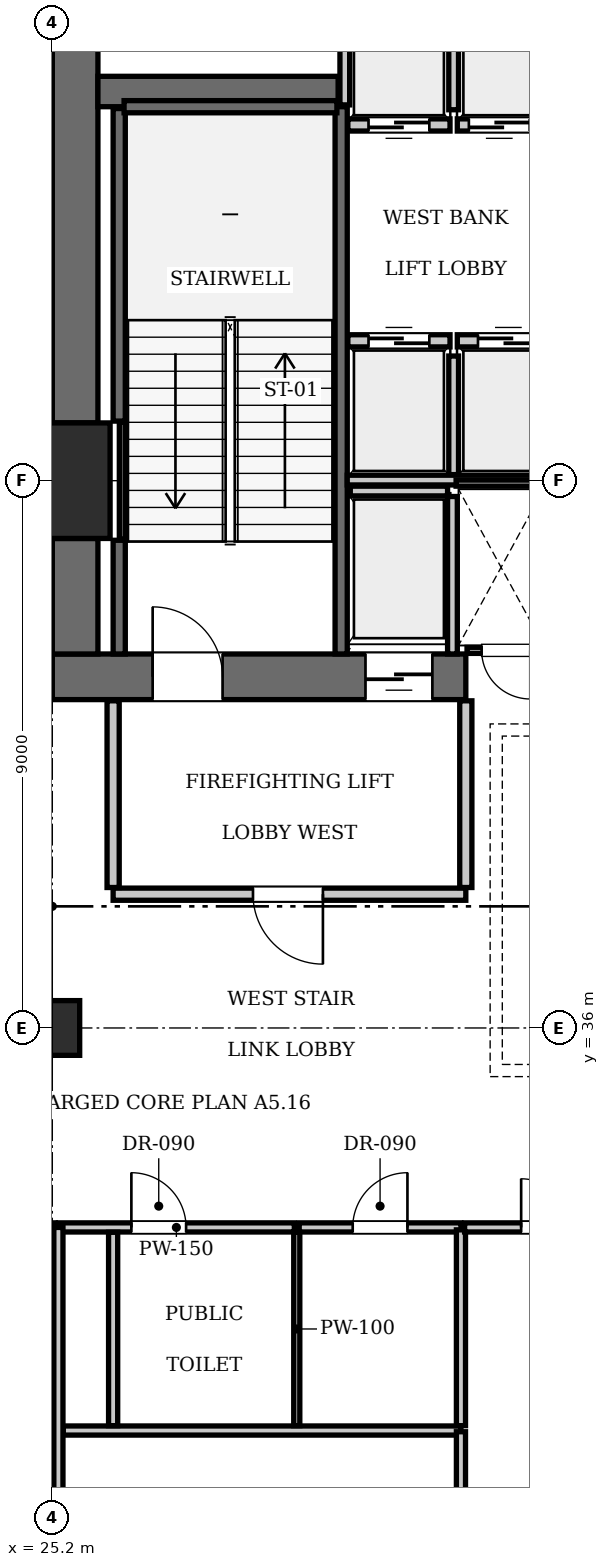
"""IFC4 building model, lengths in metres.
Left out: names, types, materials, properties, quantities, classifications, styles, units other than length and angle.
Written with IfcOpenShell. Run it as: python <this file> out.ifc"""

import sys

from ifc_helpers import new_model, si_unit, direction, frame, frame_2d, origin, origin_2d, place, context, subcontext, project, spatial, rectangle, extrude, element, fill, save


model = new_model("IFC4")
c1 = context("Model", 3, precision=1e-05, world=origin(), true_north=direction((0.0, 1.0)))
c2 = subcontext(c1, "Body", "Model", "MODEL_VIEW")
j1 = project(units=[si_unit("LENGTHUNIT", "METRE"), si_unit("PLANEANGLEUNIT", "RADIAN")], contexts=[c1])
p1 = place(None, origin())
s1 = spatial("IfcSite", under=j1, at=p1, CompositionType="ELEMENT")
p2 = place(p1, origin())
s2 = spatial("IfcBuilding", under=s1, at=p2, CompositionType="ELEMENT")
p3 = place(p2, frame((0.0, 0.0, 122.5)))
s3 = spatial("IfcBuildingStorey", under=s2, at=p3, CompositionType="ELEMENT", Elevation=122.5)
p4 = place(p3, frame((25.2, 45.0, 0.0), z_axis=(0.0, 0.0, 1.0), x_axis=(1.0, 0.0, 0.0)))
e1 = element("IfcColumn", 1, at=p4, inside=s3, PredefinedType="COLUMN", context=c2, shape_type="SweptSolid", body=[
    extrude(rectangle(XDim=1.9, YDim=1.9, at=origin_2d()), origin(), (0.0, 0.0, 1.0), 4.9),
])
p5 = place(p3, frame((25.2, 41.775, 0.0), z_axis=(0.0, 0.0, 1.0), x_axis=(1.0, 0.0, 0.0)))
e2 = element("IfcWall", 2, at=p5, inside=s3, PredefinedType="SHEAR", context=c2, shape_type="SweptSolid", body=[
    extrude(rectangle(XDim=6.8, YDim=0.75, at=frame_2d((3.4, 0.0))), origin(), (0.0, 0.0, 1.0), 4.9),
])
p6 = place(p5, frame((1.65, 0.0, 0.0)))
e3 = element("IfcOpeningElement", 3, at=p6, cuts=e2, PredefinedType="OPENING", context=c2, shape_type="SweptSolid", body=[
    extrude(rectangle(XDim=1.15, YDim=2.15, at=frame_2d((0.575, 1.075))), frame((0.0, 0.385, 0.0), z_axis=(0.0, -1.0, 0.0), x_axis=(1.0, 0.0, 0.0)), (0.0, 0.0, 1.0), 0.77),
])
p7 = place(p5, frame((5.15, 0.0, 0.0)))
e4 = element("IfcOpeningElement", 4, at=p7, cuts=e2, PredefinedType="OPENING", context=c2, shape_type="SweptSolid", body=[
    extrude(rectangle(XDim=1.1, YDim=2.2, at=frame_2d((0.55, 1.1))), frame((0.0, 0.385, 0.0), z_axis=(0.0, -1.0, 0.0), x_axis=(1.0, 0.0, 0.0)), (0.0, 0.0, 1.0), 0.77),
])
p8 = place(p3, frame((25.575, 42.15, 0.0), z_axis=(0.0, 0.0, 1.0), x_axis=(0.0, 1.0, 0.0)))
e5 = element("IfcWall", 5, at=p8, inside=s3, PredefinedType="SHEAR", context=c2, shape_type="SweptSolid", body=[
    extrude(rectangle(XDim=1.9, YDim=0.75, at=frame_2d((0.95, 0.0))), origin(), (0.0, 0.0, 1.0), 4.9),
])
p9 = place(p3, frame((25.575, 45.95, 0.0), z_axis=(0.0, 0.0, 1.0), x_axis=(0.0, 1.0, 0.0)))
e6 = element("IfcWall", 6, at=p9, inside=s3, PredefinedType="SHEAR", context=c2, shape_type="SweptSolid", body=[
    extrude(rectangle(XDim=7.3, YDim=0.75, at=frame_2d((3.65, 0.0))), origin(), (0.0, 0.0, 1.0), 4.9),
])
p10 = place(p3, frame((25.95, 51.4, 0.0), z_axis=(0.0, 0.0, 1.0), x_axis=(1.0, 0.0, 0.0)))
e7 = element("IfcWall", 7, at=p10, inside=s3, PredefinedType="SHEAR", context=c2, shape_type="SweptSolid", body=[
    extrude(rectangle(XDim=3.95, YDim=0.5, at=frame_2d((1.975, 0.0))), origin(), (0.0, 0.0, 1.0), 4.9),
])
p11 = place(p3, frame((25.2, 36.0, 0.0), z_axis=(0.0, 0.0, 1.0), x_axis=(1.0, 0.0, 0.0)))
e8 = element("IfcColumn", 8, at=p11, inside=s3, PredefinedType="COLUMN", context=c2, shape_type="SweptSolid", body=[
    extrude(rectangle(XDim=0.9, YDim=0.9, at=origin_2d()), origin(), (0.0, 0.0, 1.0), 4.9),
])
p12 = place(p3, frame((29.95, 42.15, 0.0), z_axis=(0.0, 0.0, 1.0), x_axis=(0.0, 1.0, 0.0)))
e9 = element("IfcWall", 9, at=p12, inside=s3, PredefinedType="SOLIDWALL", context=c2, shape_type="SweptSolid", body=[
    extrude(rectangle(XDim=9.0, YDim=0.2, at=frame_2d((4.5, 0.0))), origin(), (0.0, 0.0, 1.0), 4.66),
])
p13 = place(p3, frame((26.3, 42.15, 0.0), z_axis=(0.0, 0.0, 1.0), x_axis=(0.0, 1.0, 0.0)))
e10 = element("IfcWall", 10, at=p13, inside=s3, PredefinedType="SOLIDWALL", context=c2, shape_type="SweptSolid", body=[
    extrude(rectangle(XDim=1.87, YDim=0.2, at=frame_2d((0.935, 0.0))), origin(), (0.0, 0.0, 1.0), 4.66),
])
p14 = place(p3, frame((26.3, 45.98, 0.0), z_axis=(0.0, 0.0, 1.0), x_axis=(0.0, 1.0, 0.0)))
e11 = element("IfcWall", 11, at=p14, inside=s3, PredefinedType="SOLIDWALL", context=c2, shape_type="SweptSolid", body=[
    extrude(rectangle(XDim=5.14, YDim=0.2, at=frame_2d((2.57, 0.0))), origin(), (0.0, 0.0, 1.0), 4.66),
])
p15 = place(p3, frame((26.38, 51.15, 0.0), z_axis=(0.0, 0.0, 1.0), x_axis=(1.0, 0.0, 0.0)))
e12 = element("IfcWall", 12, at=p15, inside=s3, PredefinedType="SOLIDWALL", context=c2, shape_type="SweptSolid", body=[
    extrude(rectangle(XDim=3.5, YDim=0.2, at=frame_2d((1.75, 0.0))), origin(), (0.0, 0.0, 1.0), 4.66),
])
p16 = place(p3, frame((26.352, 44.04, 0.0), z_axis=(0.0, 0.0, 1.0), x_axis=(0.0, 1.0, 0.0)))
e13 = element("IfcWall", 13, at=p16, inside=s3, PredefinedType="SOLIDWALL", context=c2, shape_type="SweptSolid", body=[
    extrude(rectangle(XDim=1.92, YDim=0.1, at=frame_2d((0.96, 0.0))), origin(), (0.0, 0.0, 1.0), 4.66),
])
p17 = place(p3, frame((30.06, 47.3, 0.0), z_axis=(0.0, 0.0, 1.0), x_axis=(1.0, 0.0, 0.0)))
e14 = element("IfcWall", 14, at=p17, inside=s3, PredefinedType="SOLIDWALL", context=c2, shape_type="SweptSolid", body=[
    extrude(rectangle(XDim=1.68, YDim=0.2, at=frame_2d((0.84, 0.0))), origin(), (0.0, 0.0, 1.0), 4.66),
])
p18 = place(p17, frame((0.34, 0.0, 0.0)))
e15 = element("IfcOpeningElement", 15, at=p18, cuts=e14, PredefinedType="OPENING", context=c2, shape_type="SweptSolid", body=[
    extrude(rectangle(XDim=1.0, YDim=2.15, at=frame_2d((0.5, 1.075))), frame((0.0, 0.11, 0.0), z_axis=(0.0, -1.0, 0.0), x_axis=(1.0, 0.0, 0.0)), (0.0, 0.0, 1.0), 0.22),
])
p19 = place(p3, frame((31.86, 47.3, 0.0), z_axis=(0.0, 0.0, 1.0), x_axis=(1.0, 0.0, 0.0)))
e16 = element("IfcWall", 16, at=p19, inside=s3, PredefinedType="SOLIDWALL", context=c2, shape_type="SweptSolid", body=[
    extrude(rectangle(XDim=1.68, YDim=0.2, at=frame_2d((0.84, 0.0))), origin(), (0.0, 0.0, 1.0), 4.66),
])
p20 = place(p19, frame((0.34, 0.0, 0.0)))
e17 = element("IfcOpeningElement", 17, at=p20, cuts=e16, PredefinedType="OPENING", context=c2, shape_type="SweptSolid", body=[
    extrude(rectangle(XDim=1.0, YDim=2.15, at=frame_2d((0.5, 1.075))), frame((0.0, 0.11, 0.0), z_axis=(0.0, -1.0, 0.0), x_axis=(1.0, 0.0, 0.0)), (0.0, 0.0, 1.0), 0.22),
])
p21 = place(p3, frame((30.06, 50.85, 0.0), z_axis=(0.0, 0.0, 1.0), x_axis=(1.0, 0.0, 0.0)))
e18 = element("IfcWall", 18, at=p21, inside=s3, PredefinedType="SOLIDWALL", context=c2, shape_type="SweptSolid", body=[
    extrude(rectangle(XDim=1.68, YDim=0.2, at=frame_2d((0.84, 0.0))), origin(), (0.0, 0.0, 1.0), 4.66),
])
p22 = place(p21, frame((0.34, 0.0, 0.0)))
e19 = element("IfcOpeningElement", 19, at=p22, cuts=e18, PredefinedType="OPENING", context=c2, shape_type="SweptSolid", body=[
    extrude(rectangle(XDim=1.0, YDim=2.15, at=frame_2d((0.5, 1.075))), frame((0.0, 0.11, 0.0), z_axis=(0.0, -1.0, 0.0), x_axis=(1.0, 0.0, 0.0)), (0.0, 0.0, 1.0), 0.22),
])
p23 = place(p3, frame((31.86, 50.85, 0.0), z_axis=(0.0, 0.0, 1.0), x_axis=(1.0, 0.0, 0.0)))
e20 = element("IfcWall", 20, at=p23, inside=s3, PredefinedType="SOLIDWALL", context=c2, shape_type="SweptSolid", body=[
    extrude(rectangle(XDim=1.38, YDim=0.2, at=frame_2d((0.69, 0.0))), origin(), (0.0, 0.0, 1.0), 4.66),
])
p24 = place(p23, frame((0.19, 0.0, 0.0)))
e21 = element("IfcOpeningElement", 21, at=p24, cuts=e20, PredefinedType="OPENING", context=c2, shape_type="SweptSolid", body=[
    extrude(rectangle(XDim=1.0, YDim=2.15, at=frame_2d((0.5, 1.075))), frame((0.0, 0.11, 0.0), z_axis=(0.0, -1.0, 0.0), x_axis=(1.0, 0.0, 0.0)), (0.0, 0.0, 1.0), 0.22),
])
p25 = place(p3, frame((30.1, 44.83, 0.0), z_axis=(0.0, 0.0, 1.0), x_axis=(1.0, 0.0, 0.0)))
e22 = element("IfcWall", 22, at=p25, inside=s3, PredefinedType="SOLIDWALL", context=c2, shape_type="SweptSolid", body=[
    extrude(rectangle(XDim=1.6, YDim=0.16, at=frame_2d((0.8, 0.0))), origin(), (0.0, 0.0, 1.0), 4.66),
])
p26 = place(p3, frame((31.78, 42.15, 0.0), z_axis=(0.0, 0.0, 1.0), x_axis=(0.0, 1.0, 0.0)))
e23 = element("IfcWall", 23, at=p26, inside=s3, PredefinedType="SOLIDWALL", context=c2, shape_type="SweptSolid", body=[
    extrude(rectangle(XDim=2.59, YDim=0.16, at=frame_2d((1.295, 0.0))), origin(), (0.0, 0.0, 1.0), 4.66),
])
p27 = place(p3, frame((31.8, 45.1, 0.0), z_axis=(0.0, 0.0, 1.0), x_axis=(0.0, 1.0, 0.0)))
e24 = element("IfcWall", 24, at=p27, inside=s3, PredefinedType="SOLIDWALL", context=c2, shape_type="SweptSolid", body=[
    extrude(rectangle(XDim=1.95, YDim=0.16, at=frame_2d((0.975, 0.0))), origin(), (0.0, 0.0, 1.0), 4.66),
])
p28 = place(p3, frame((30.05, 45.01, 0.0), z_axis=(0.0, 0.0, 1.0), x_axis=(1.0, 0.0, 0.0)))
e25 = element("IfcWall", 25, at=p28, inside=s3, PredefinedType="SOLIDWALL", context=c2, shape_type="SweptSolid", body=[
    extrude(rectangle(XDim=3.45, YDim=0.16, at=frame_2d((1.725, 0.0))), origin(), (0.0, 0.0, 1.0), 4.66),
])
p29 = place(p3, frame((30.01, 51.18, 0.0), z_axis=(0.0, 0.0, 1.0), x_axis=(0.0, 1.0, 0.0)))
e26 = element("IfcWall", 26, at=p29, inside=s3, PredefinedType="SOLIDWALL", context=c2, shape_type="SweptSolid", body=[
    extrude(rectangle(XDim=2.07, YDim=0.16, at=frame_2d((1.035, 0.0))), origin(), (0.0, 0.0, 1.0), 4.66),
])
p30 = place(p3, frame((31.8, 51.1, 0.0), z_axis=(0.0, 0.0, 1.0), x_axis=(0.0, 1.0, 0.0)))
e27 = element("IfcWall", 27, at=p30, inside=s3, PredefinedType="SOLIDWALL", context=c2, shape_type="SweptSolid", body=[
    extrude(rectangle(XDim=2.15, YDim=0.16, at=frame_2d((1.075, 0.0))), origin(), (0.0, 0.0, 1.0), 4.66),
])
p31 = place(p3, frame((26.2, 38.2, 0.0), z_axis=(0.0, 0.0, 1.0), x_axis=(1.0, 0.0, 0.0)))
e28 = element("IfcWall", 28, at=p31, inside=s3, PredefinedType="PARTITIONING", context=c2, shape_type="SweptSolid", body=[
    extrude(rectangle(XDim=5.8, YDim=0.2, at=frame_2d((2.9, 0.0))), origin(), (0.0, 0.0, 1.0), 4.66),
])
p32 = place(p31, frame((2.3, 0.0, 0.0)))
e29 = element("IfcOpeningElement", 29, at=p32, cuts=e28, PredefinedType="OPENING", context=c2, shape_type="SweptSolid", body=[
    extrude(rectangle(XDim=1.15, YDim=2.15, at=frame_2d((0.575, 1.075))), frame((0.0, 0.11, 0.0), z_axis=(0.0, -1.0, 0.0), x_axis=(1.0, 0.0, 0.0)), (0.0, 0.0, 1.0), 0.22),
])
for number, where, z_axis, x_axis in (
    (30, (26.2, 38.31, 0.0), (0.0, 0.0, 1.0), (0.0, 1.0, 0.0)),
    (31, (32.0, 38.31, 0.0), (0.0, 0.0, 1.0), (0.0, 1.0, 0.0)),
):
    element("IfcWall", number, at=place(p3, frame(where, z_axis=z_axis, x_axis=x_axis)), inside=s3, PredefinedType="PARTITIONING", context=c2, shape_type="SweptSolid", body=[
        extrude(rectangle(XDim=3.07, YDim=0.2, at=frame_2d((1.535, 0.0))), origin(), (0.0, 0.0, 1.0), 4.66),
    ])
p33 = place(p3, frame((32.02, 42.21, 0.0), z_axis=(0.0, 0.0, 1.0), x_axis=(1.0, 0.0, 0.0)))
e32 = element("IfcWall", 32, at=p33, inside=s3, PredefinedType="PARTITIONING", context=c2, shape_type="SweptSolid", body=[
    extrude(rectangle(XDim=1.32, YDim=0.1, at=frame_2d((0.66, 0.0))), origin(), (0.0, 0.0, 1.0), 4.66),
])
p34 = place(p33, frame((0.24, 0.0, 0.0)))
e33 = element("IfcOpeningElement", 33, at=p34, cuts=e32, PredefinedType="OPENING", context=c2, shape_type="SweptSolid", body=[
    extrude(rectangle(XDim=0.8, YDim=2.05, at=frame_2d((0.4, 1.025))), frame((0.0, 0.06, 0.0), z_axis=(0.0, -1.0, 0.0), x_axis=(1.0, 0.0, 0.0)), (0.0, 0.0, 1.0), 0.12),
])
p35 = place(p3, frame((31.84, 44.96, 0.0), z_axis=(0.0, 0.0, 1.0), x_axis=(1.0, 0.0, 0.0)))
e34 = element("IfcWall", 34, at=p35, inside=s3, PredefinedType="PARTITIONING", context=c2, shape_type="SweptSolid", body=[
    extrude(rectangle(XDim=1.48, YDim=0.1, at=frame_2d((0.74, 0.0))), origin(), (0.0, 0.0, 1.0), 4.66),
])
p36 = place(p3, frame((25.3, 32.72, 0.0), z_axis=(0.0, 0.0, 1.0), x_axis=(1.0, 0.0, 0.0)))
e35 = element("IfcWall", 35, at=p36, inside=s3, PredefinedType="PARTITIONING", context=c2, shape_type="SweptSolid", body=[
    extrude(rectangle(XDim=3.88, YDim=0.15, at=frame_2d((1.94, 0.0))), origin(), (0.0, 0.0, 1.0), 4.66),
])
p37 = place(p36, frame((1.2, 0.0, 0.0)))
e36 = element("IfcOpeningElement", 36, at=p37, cuts=e35, PredefinedType="OPENING", context=c2, shape_type="SweptSolid", body=[
    extrude(rectangle(XDim=0.9, YDim=2.1, at=frame_2d((0.45, 1.05))), frame((0.0, 0.085, 0.0), z_axis=(0.0, -1.0, 0.0), x_axis=(1.0, 0.0, 0.0)), (0.0, 0.0, 1.0), 0.17),
])
p38 = place(p3, frame((29.26, 32.72, 0.0), z_axis=(0.0, 0.0, 1.0), x_axis=(1.0, 0.0, 0.0)))
e37 = element("IfcWall", 37, at=p38, inside=s3, PredefinedType="PARTITIONING", context=c2, shape_type="SweptSolid", body=[
    extrude(rectangle(XDim=2.66, YDim=0.15, at=frame_2d((1.33, 0.0))), origin(), (0.0, 0.0, 1.0), 4.66),
])
p39 = place(p38, frame((0.88, 0.0, 0.0)))
e38 = element("IfcOpeningElement", 38, at=p39, cuts=e37, PredefinedType="OPENING", context=c2, shape_type="SweptSolid", body=[
    extrude(rectangle(XDim=0.9, YDim=2.1, at=frame_2d((0.45, 1.05))), frame((0.0, 0.085, 0.0), z_axis=(0.0, -1.0, 0.0), x_axis=(1.0, 0.0, 0.0)), (0.0, 0.0, 1.0), 0.17),
])
p40 = place(p3, frame((25.38, 29.38, 0.0), z_axis=(0.0, 0.0, 1.0), x_axis=(1.0, 0.0, 0.0)))
e39 = element("IfcWall", 39, at=p40, inside=s3, PredefinedType="PARTITIONING", context=c2, shape_type="SweptSolid", body=[
    extrude(rectangle(XDim=6.54, YDim=0.15, at=frame_2d((3.27, 0.0))), origin(), (0.0, 0.0, 1.0), 4.66),
])
p41 = place(p3, frame((26.2, 29.46, 0.0), z_axis=(0.0, 0.0, 1.0), x_axis=(0.0, 1.0, 0.0)))
e40 = element("IfcWall", 40, at=p41, inside=s3, PredefinedType="PARTITIONING", context=c2, shape_type="SweptSolid", body=[
    extrude(rectangle(XDim=3.18, YDim=0.15, at=frame_2d((1.59, 0.0))), origin(), (0.0, 0.0, 1.0), 4.66),
])
p42 = place(p3, frame((29.22, 29.46, 0.0), z_axis=(0.0, 0.0, 1.0), x_axis=(0.0, 1.0, 0.0)))
e41 = element("IfcWall", 41, at=p42, inside=s3, PredefinedType="PARTITIONING", context=c2, shape_type="SweptSolid", body=[
    extrude(rectangle(XDim=3.18, YDim=0.1, at=frame_2d((1.59, 0.0))), origin(), (0.0, 0.0, 1.0), 4.66),
])
p43 = place(p3, frame((31.92, 29.46, 0.0), z_axis=(0.0, 0.0, 1.0), x_axis=(0.0, 1.0, 0.0)))
e42 = element("IfcWall", 42, at=p43, inside=s3, PredefinedType="PARTITIONING", context=c2, shape_type="SweptSolid", body=[
    extrude(rectangle(XDim=3.22, YDim=0.15, at=frame_2d((1.61, 0.0))), origin(), (0.0, 0.0, 1.0), 4.66),
])
p44 = place(p3, frame((31.92, 21.08, 0.0), z_axis=(0.0, 0.0, 1.0), x_axis=(0.0, 1.0, 0.0)))
e43 = element("IfcWall", 43, at=p44, inside=s3, PredefinedType="PARTITIONING", context=c2, shape_type="SweptSolid", body=[
    extrude(rectangle(XDim=8.28, YDim=0.15, at=frame_2d((4.14, 0.0))), origin(), (0.0, 0.0, 1.0), 4.66),
])
p45 = place(p44, frame((3.69, 0.0, 0.0)))
e44 = element("IfcOpeningElement", 44, at=p45, cuts=e43, PredefinedType="OPENING", context=c2, shape_type="SweptSolid", body=[
    extrude(rectangle(XDim=0.9, YDim=2.1, at=frame_2d((0.45, 1.05))), frame((0.0, 0.085, 0.0), z_axis=(0.0, -1.0, 0.0), x_axis=(1.0, 0.0, 0.0)), (0.0, 0.0, 1.0), 0.17),
])
p46 = place(p3, frame((31.98, 32.72, 0.0), z_axis=(0.0, 0.0, 1.0), x_axis=(1.0, 0.0, 0.0)))
e45 = element("IfcWall", 45, at=p46, inside=s3, PredefinedType="PARTITIONING", context=c2, shape_type="SweptSolid", body=[
    extrude(rectangle(XDim=3.46, YDim=0.15, at=frame_2d((1.73, 0.0))), origin(), (0.0, 0.0, 1.0), 4.66),
])
p47 = place(p46, frame((0.93, 0.0, 0.0)))
e46 = element("IfcOpeningElement", 46, at=p47, cuts=e45, PredefinedType="OPENING", context=c2, shape_type="SweptSolid", body=[
    extrude(rectangle(XDim=1.6, YDim=2.3, at=frame_2d((0.8, 1.15))), frame((0.0, 0.085, 0.0), z_axis=(0.0, -1.0, 0.0), x_axis=(1.0, 0.0, 0.0)), (0.0, 0.0, 1.0), 0.17),
])
p48 = place(p3, frame((13.18, 32.72, 0.0), z_axis=(0.0, 0.0, 1.0), x_axis=(1.0, 0.0, 0.0)))
e47 = element("IfcWall", 47, at=p48, inside=s3, PredefinedType="PARTITIONING", context=c2, shape_type="SweptSolid", body=[
    extrude(rectangle(XDim=12.07, YDim=0.15, at=frame_2d((6.035, 0.0))), origin(), (0.0, 0.0, 1.0), 4.66),
])
p49 = place(p48, frame((5.335, 0.0, 0.0)))
e48 = element("IfcOpeningElement", 48, at=p49, cuts=e47, PredefinedType="OPENING", context=c2, shape_type="SweptSolid", body=[
    extrude(rectangle(XDim=1.4, YDim=2.2, at=frame_2d((0.7, 1.1))), frame((0.0, 0.085, 0.0), z_axis=(0.0, -1.0, 0.0), x_axis=(1.0, 0.0, 0.0)), (0.0, 0.0, 1.0), 0.17),
])
p50 = place(p3, frame((25.3, 4.68, 0.0), z_axis=(0.0, 0.0, 1.0), x_axis=(0.0, 1.0, 0.0)))
e49 = element("IfcWall", 49, at=p50, inside=s3, PredefinedType="PARTITIONING", context=c2, shape_type="SweptSolid", body=[
    extrude(rectangle(XDim=28.04, YDim=0.15, at=frame_2d((14.02, 0.0))), origin(), (0.0, 0.0, 1.0), 4.048),
])
p51 = place(p6, origin())
e50 = element("IfcDoor", 50, at=p51, inside=s3, OperationType="SINGLE_SWING_LEFT", PredefinedType="DOOR", context=c2, shape_type="SweptSolid", body=[
    extrude(rectangle(XDim=1.15, YDim=2.15, at=frame_2d((0.575, 1.075))), frame((0.0, 0.025, 0.0), z_axis=(0.0, -1.0, 0.0), x_axis=(1.0, 0.0, 0.0)), (0.0, 0.0, 1.0), 0.05),
])
fill(e3, e50)
p52 = place(p18, origin())
e51 = element("IfcDoor", 51, at=p52, inside=s3, OperationType="SLIDING_TO_LEFT", PredefinedType="DOOR", context=c2, shape_type="SweptSolid", body=[
    extrude(rectangle(XDim=1.0, YDim=2.15, at=frame_2d((0.5, 1.075))), frame((0.0, 0.025, 0.0), z_axis=(0.0, -1.0, 0.0), x_axis=(1.0, 0.0, 0.0)), (0.0, 0.0, 1.0), 0.05),
])
fill(e15, e51)
p53 = place(p20, origin())
e52 = element("IfcDoor", 52, at=p53, inside=s3, OperationType="SLIDING_TO_LEFT", PredefinedType="DOOR", context=c2, shape_type="SweptSolid", body=[
    extrude(rectangle(XDim=1.0, YDim=2.15, at=frame_2d((0.5, 1.075))), frame((0.0, 0.025, 0.0), z_axis=(0.0, -1.0, 0.0), x_axis=(1.0, 0.0, 0.0)), (0.0, 0.0, 1.0), 0.05),
])
fill(e17, e52)
p54 = place(p22, frame((1.0, 0.0, 0.0), z_axis=(0.0, 0.0, 1.0), x_axis=(-1.0, 0.0, 0.0)))
e53 = element("IfcDoor", 53, at=p54, inside=s3, OperationType="SLIDING_TO_LEFT", PredefinedType="DOOR", context=c2, shape_type="SweptSolid", body=[
    extrude(rectangle(XDim=1.0, YDim=2.15, at=frame_2d((0.5, 1.075))), frame((0.0, 0.025, 0.0), z_axis=(0.0, -1.0, 0.0), x_axis=(1.0, 0.0, 0.0)), (0.0, 0.0, 1.0), 0.05),
])
fill(e19, e53)
p55 = place(p24, frame((1.0, 0.0, 0.0), z_axis=(0.0, 0.0, 1.0), x_axis=(-1.0, 0.0, 0.0)))
e54 = element("IfcDoor", 54, at=p55, inside=s3, OperationType="SLIDING_TO_LEFT", PredefinedType="DOOR", context=c2, shape_type="SweptSolid", body=[
    extrude(rectangle(XDim=1.0, YDim=2.15, at=frame_2d((0.5, 1.075))), frame((0.0, 0.025, 0.0), z_axis=(0.0, -1.0, 0.0), x_axis=(1.0, 0.0, 0.0)), (0.0, 0.0, 1.0), 0.05),
])
fill(e21, e54)
p56 = place(p7, frame((1.1, 0.0, 0.0), z_axis=(0.0, 0.0, 1.0), x_axis=(-1.0, 0.0, 0.0)))
e55 = element("IfcDoor", 55, at=p56, inside=s3, OperationType="SLIDING_TO_LEFT", PredefinedType="DOOR", context=c2, shape_type="SweptSolid", body=[
    extrude(rectangle(XDim=1.1, YDim=2.2, at=frame_2d((0.55, 1.1))), frame((0.0, 0.025, 0.0), z_axis=(0.0, -1.0, 0.0), x_axis=(1.0, 0.0, 0.0)), (0.0, 0.0, 1.0), 0.05),
])
fill(e4, e55)
p57 = place(p32, frame((1.15, 0.0, 0.0), z_axis=(0.0, 0.0, 1.0), x_axis=(-1.0, 0.0, 0.0)))
e56 = element("IfcDoor", 56, at=p57, inside=s3, OperationType="SINGLE_SWING_LEFT", PredefinedType="DOOR", context=c2, shape_type="SweptSolid", body=[
    extrude(rectangle(XDim=1.15, YDim=2.15, at=frame_2d((0.575, 1.075))), frame((0.0, 0.025, 0.0), z_axis=(0.0, -1.0, 0.0), x_axis=(1.0, 0.0, 0.0)), (0.0, 0.0, 1.0), 0.05),
])
fill(e29, e56)
p58 = place(p34, frame((0.8, 0.0, 0.0), z_axis=(0.0, 0.0, 1.0), x_axis=(-1.0, 0.0, 0.0)))
e57 = element("IfcDoor", 57, at=p58, inside=s3, OperationType="SINGLE_SWING_LEFT", PredefinedType="DOOR", context=c2, shape_type="SweptSolid", body=[
    extrude(rectangle(XDim=0.8, YDim=2.05, at=frame_2d((0.4, 1.025))), frame((0.0, 0.025, 0.0), z_axis=(0.0, -1.0, 0.0), x_axis=(1.0, 0.0, 0.0)), (0.0, 0.0, 1.0), 0.05),
])
fill(e33, e57)
p59 = place(p37, origin())
e58 = element("IfcDoor", 58, at=p59, inside=s3, OperationType="SINGLE_SWING_LEFT", PredefinedType="DOOR", context=c2, shape_type="SweptSolid", body=[
    extrude(rectangle(XDim=0.9, YDim=2.1, at=frame_2d((0.45, 1.05))), frame((0.0, 0.025, 0.0), z_axis=(0.0, -1.0, 0.0), x_axis=(1.0, 0.0, 0.0)), (0.0, 0.0, 1.0), 0.05),
])
fill(e36, e58)
p60 = place(p39, origin())
e59 = element("IfcDoor", 59, at=p60, inside=s3, OperationType="SINGLE_SWING_RIGHT", PredefinedType="DOOR", context=c2, shape_type="SweptSolid", body=[
    extrude(rectangle(XDim=0.9, YDim=2.1, at=frame_2d((0.45, 1.05))), frame((0.0, 0.025, 0.0), z_axis=(0.0, -1.0, 0.0), x_axis=(1.0, 0.0, 0.0)), (0.0, 0.0, 1.0), 0.05),
])
fill(e38, e59)
p61 = place(p47, origin())
e60 = element("IfcDoor", 60, at=p61, inside=s3, OperationType="DOUBLE_DOOR_SINGLE_SWING", PredefinedType="DOOR", context=c2, shape_type="SweptSolid", body=[
    extrude(rectangle(XDim=1.6, YDim=2.3, at=frame_2d((0.8, 1.15))), frame((0.0, 0.025, 0.0), z_axis=(0.0, -1.0, 0.0), x_axis=(1.0, 0.0, 0.0)), (0.0, 0.0, 1.0), 0.05),
])
fill(e46, e60)
save(model, sys.argv[1])
